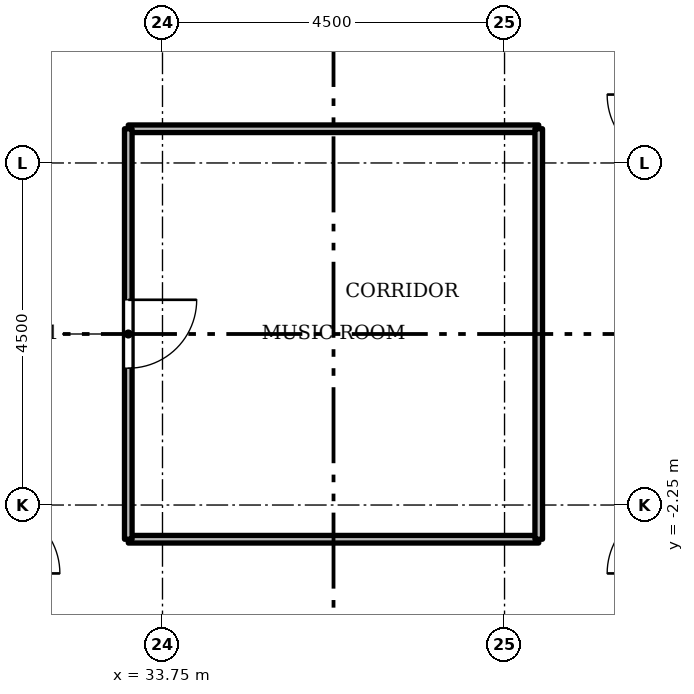
"""IFC4 building model, lengths in metres.
Left out: names, types, materials, properties, quantities, classifications, styles, units other than length and angle.
Written with IfcOpenShell. Run it as: python <this file> out.ifc"""

import sys

from ifc_helpers import new_model, si_unit, direction, frame, frame_2d, origin, place, context, subcontext, project, spatial, rectangle, extrude, element, fill, save


model = new_model("IFC4")
c1 = context("Model", 3, precision=1e-05, world=origin(), true_north=direction((0.0, 1.0)))
c2 = subcontext(c1, "Body", "Model", "MODEL_VIEW")
j1 = project(units=[si_unit("LENGTHUNIT", "METRE"), si_unit("PLANEANGLEUNIT", "RADIAN")], contexts=[c1])
p1 = place(None, origin())
s1 = spatial("IfcSite", under=j1, at=p1, CompositionType="ELEMENT")
p2 = place(p1, origin())
s2 = spatial("IfcBuilding", under=s1, at=p2, CompositionType="ELEMENT")
p3 = place(p2, frame((0.0, 0.0, 202.8)))
s3 = spatial("IfcBuildingStorey", under=s2, at=p3, CompositionType="ELEMENT", Elevation=202.8)
for number, where, z_axis, x_axis in (
    (1, (38.7, -2.7, 0.0), (0.0, 0.0, 1.0), (-1.0, 0.0, 0.0)),
    (2, (38.7, 2.7, 0.0), (0.0, 0.0, 1.0), (-1.0, 0.0, 0.0)),
    (3, (38.7, -2.7, 0.0), (0.0, 0.0, 1.0), (0.0, 1.0, 0.0)),
):
    element("IfcWall", number, at=place(p3, frame(where, z_axis=z_axis, x_axis=x_axis)), inside=s3, PredefinedType="PARTITIONING", context=c2, shape_type="SweptSolid", body=[
        extrude(rectangle(XDim=5.4, YDim=0.1, at=frame_2d((2.7, 0.0))), origin(), (0.0, 0.0, 1.0), 3.0),
    ])
p4 = place(p3, frame((33.3, -2.7, 0.0), z_axis=(0.0, 0.0, 1.0), x_axis=(0.0, 1.0, 0.0)))
e4 = element("IfcWall", 4, at=p4, inside=s3, PredefinedType="PARTITIONING", context=c2, shape_type="SweptSolid", body=[
    extrude(rectangle(XDim=5.4, YDim=0.1, at=frame_2d((2.7, 0.0))), origin(), (0.0, 0.0, 1.0), 3.0),
])
p5 = place(p4, frame((2.25, 0.0, 0.0)))
e5 = element("IfcOpeningElement", 5, at=p5, cuts=e4, PredefinedType="OPENING", context=c2, shape_type="SweptSolid", body=[
    extrude(rectangle(XDim=0.9, YDim=2.1, at=frame_2d((0.45, 1.05))), frame((0.0, 0.06, 0.0), z_axis=(0.0, -1.0, 0.0), x_axis=(1.0, 0.0, 0.0)), (0.0, 0.0, 1.0), 0.12),
])
p6 = place(p5, origin())
e6 = element("IfcDoor", 6, at=p6, inside=s3, OperationType="SINGLE_SWING_RIGHT", PredefinedType="DOOR", context=c2, shape_type="SweptSolid", body=[
    extrude(rectangle(XDim=0.9, YDim=2.1, at=frame_2d((0.45, 1.05))), frame((0.0, 0.025, 0.0), z_axis=(0.0, -1.0, 0.0), x_axis=(1.0, 0.0, 0.0)), (0.0, 0.0, 1.0), 0.05),
])
fill(e5, e6)
save(model, sys.argv[1])
